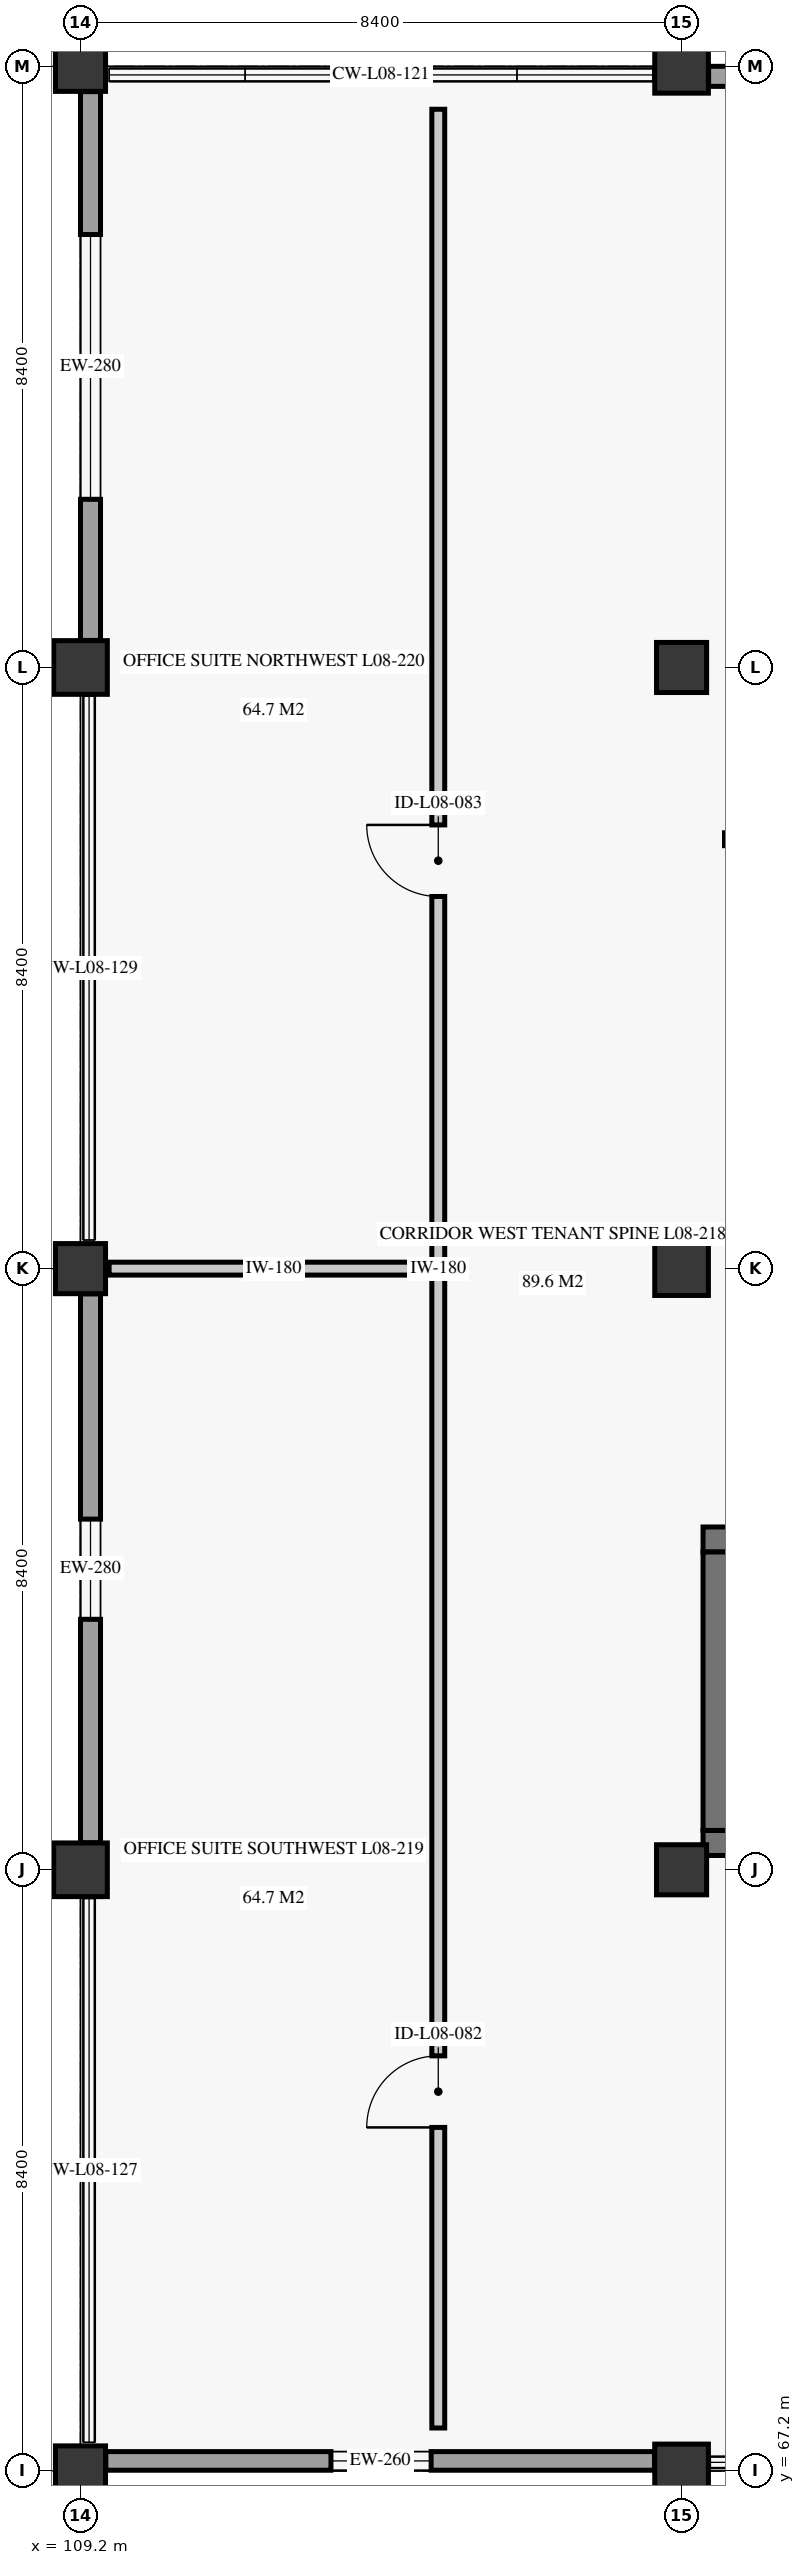
"""IFC4 building model, lengths in metres.
Left out: names, types, materials, properties, quantities, classifications, styles, units other than length and angle.
Written with IfcOpenShell. Run it as: python <this file> out.ifc"""

import sys

from ifc_helpers import new_model, si_unit, direction, frame, frame_2d, origin, origin_2d, place, context, subcontext, project, spatial, rectangle, extrude, element, fill, save


model = new_model("IFC4")
c1 = context("Model", 3, precision=1e-05, world=origin(), true_north=direction((0.0, 1.0)))
c2 = subcontext(c1, "Body", "Model", "MODEL_VIEW")
j1 = project(units=[si_unit("LENGTHUNIT", "METRE"), si_unit("PLANEANGLEUNIT", "RADIAN")], contexts=[c1])
p1 = place(None, origin())
s1 = spatial("IfcSite", under=j1, at=p1, CompositionType="ELEMENT")
p2 = place(p1, origin())
s2 = spatial("IfcBuilding", under=s1, at=p2, CompositionType="ELEMENT")
p3 = place(p2, frame((0.0, 0.0, 34.7)))
s3 = spatial("IfcBuildingStorey", under=s2, at=p3, CompositionType="ELEMENT", Elevation=34.7)
p4 = place(p3, frame((109.2, 67.2, 0.0), z_axis=(0.0, 0.0, 1.0), x_axis=(1.0, 0.0, 0.0)))
e1 = element("IfcColumn", 1, at=p4, inside=s3, PredefinedType="COLUMN", context=c2, shape_type="SweptSolid", body=[
    extrude(rectangle(XDim=0.7, YDim=0.7, at=origin_2d()), origin(), (0.0, 0.0, 1.0), 3.72),
])
p5 = place(p3, frame((109.2, 75.6, 0.0), z_axis=(0.0, 0.0, 1.0), x_axis=(1.0, 0.0, 0.0)))
e2 = element("IfcColumn", 2, at=p5, inside=s3, PredefinedType="COLUMN", context=c2, shape_type="SweptSolid", body=[
    extrude(rectangle(XDim=0.75, YDim=0.75, at=origin_2d()), origin(), (0.0, 0.0, 1.0), 3.72),
])
p6 = place(p3, frame((109.2, 84.0, 0.0), z_axis=(0.0, 0.0, 1.0), x_axis=(1.0, 0.0, 0.0)))
e3 = element("IfcColumn", 3, at=p6, inside=s3, PredefinedType="COLUMN", context=c2, shape_type="SweptSolid", body=[
    extrude(rectangle(XDim=0.7, YDim=0.7, at=origin_2d()), origin(), (0.0, 0.0, 1.0), 3.72),
])
p7 = place(p3, frame((109.2, 92.4, 0.0), z_axis=(0.0, 0.0, 1.0), x_axis=(1.0, 0.0, 0.0)))
e4 = element("IfcColumn", 4, at=p7, inside=s3, PredefinedType="COLUMN", context=c2, shape_type="SweptSolid", body=[
    extrude(rectangle(XDim=0.75, YDim=0.75, at=origin_2d()), origin(), (0.0, 0.0, 1.0), 3.72),
])
p8 = place(p3, frame((109.2, 100.8, 0.0), z_axis=(0.0, 0.0, 1.0), x_axis=(1.0, 0.0, 0.0)))
e5 = element("IfcColumn", 5, at=p8, inside=s3, PredefinedType="COLUMN", context=c2, shape_type="SweptSolid", body=[
    extrude(rectangle(XDim=0.7, YDim=0.7, at=origin_2d()), origin(), (0.0, 0.0, 1.0), 3.72),
])
p9 = place(p3, frame((117.6, 67.2, 0.0), z_axis=(0.0, 0.0, 1.0), x_axis=(1.0, 0.0, 0.0)))
e6 = element("IfcColumn", 6, at=p9, inside=s3, PredefinedType="COLUMN", context=c2, shape_type="SweptSolid", body=[
    extrude(rectangle(XDim=0.75, YDim=0.75, at=origin_2d()), origin(), (0.0, 0.0, 1.0), 3.72),
])
p10 = place(p3, frame((117.6, 75.6, 0.0), z_axis=(0.0, 0.0, 1.0), x_axis=(1.0, 0.0, 0.0)))
e7 = element("IfcColumn", 7, at=p10, inside=s3, PredefinedType="COLUMN", context=c2, shape_type="SweptSolid", body=[
    extrude(rectangle(XDim=0.7, YDim=0.7, at=origin_2d()), origin(), (0.0, 0.0, 1.0), 3.72),
])
p11 = place(p3, frame((117.6, 84.0, 0.0), z_axis=(0.0, 0.0, 1.0), x_axis=(1.0, 0.0, 0.0)))
e8 = element("IfcColumn", 8, at=p11, inside=s3, PredefinedType="COLUMN", context=c2, shape_type="SweptSolid", body=[
    extrude(rectangle(XDim=0.75, YDim=0.75, at=origin_2d()), origin(), (0.0, 0.0, 1.0), 3.72),
])
p12 = place(p3, frame((117.6, 92.4, 0.0), z_axis=(0.0, 0.0, 1.0), x_axis=(1.0, 0.0, 0.0)))
e9 = element("IfcColumn", 9, at=p12, inside=s3, PredefinedType="COLUMN", context=c2, shape_type="SweptSolid", body=[
    extrude(rectangle(XDim=0.7, YDim=0.7, at=origin_2d()), origin(), (0.0, 0.0, 1.0), 3.72),
])
p13 = place(p3, frame((117.6, 100.8, 0.0), z_axis=(0.0, 0.0, 1.0), x_axis=(1.0, 0.0, 0.0)))
e10 = element("IfcColumn", 10, at=p13, inside=s3, PredefinedType="COLUMN", context=c2, shape_type="SweptSolid", body=[
    extrude(rectangle(XDim=0.75, YDim=0.75, at=origin_2d()), origin(), (0.0, 0.0, 1.0), 3.72),
])
p14 = place(p3, frame((109.554, 67.34, 0.0), z_axis=(0.0, 0.0, 1.0), x_axis=(1.0, 0.0, 0.0)))
e11 = element("IfcWall", 11, at=p14, inside=s3, PredefinedType="SOLIDWALL", context=c2, shape_type="SweptSolid", body=[
    extrude(rectangle(XDim=7.668, YDim=0.26, at=frame_2d((3.834, 0.0))), origin(), (0.0, 0.0, 1.0), 3.04),
])
p15 = place(p14, frame((3.146, 0.0, 0.85)))
e12 = element("IfcOpeningElement", 12, at=p15, cuts=e11, PredefinedType="OPENING", context=c2, shape_type="SweptSolid", body=[
    extrude(rectangle(XDim=1.4, YDim=1.7, at=frame_2d((0.7, 0.85))), frame((0.0, 0.14, 0.0), z_axis=(0.0, -1.0, 0.0), x_axis=(1.0, 0.0, 0.0)), (0.0, 0.0, 1.0), 0.28),
])
p16 = place(p3, frame((117.978, 100.66, 0.0), z_axis=(0.0, 0.0, 1.0), x_axis=(1.0, 0.0, 0.0)))
e13 = element("IfcWall", 13, at=p16, inside=s3, PredefinedType="SOLIDWALL", context=c2, shape_type="SweptSolid", body=[
    extrude(rectangle(XDim=7.67, YDim=0.28, at=frame_2d((3.835, 0.0))), origin(), (0.0, 0.0, 1.0), 3.04),
])
p17 = place(p16, frame((2.422, 0.0, 0.85)))
e14 = element("IfcOpeningElement", 14, at=p17, cuts=e13, PredefinedType="OPENING", context=c2, shape_type="SweptSolid", body=[
    extrude(rectangle(XDim=2.8, YDim=1.85, at=frame_2d((1.4, 0.925))), frame((0.0, 0.15, 0.0), z_axis=(0.0, -1.0, 0.0), x_axis=(1.0, 0.0, 0.0)), (0.0, 0.0, 1.0), 0.3),
])
p18 = place(p3, frame((109.34, 75.978, 0.0), z_axis=(0.0, 0.0, 1.0), x_axis=(0.0, 1.0, 0.0)))
e15 = element("IfcWall", 15, at=p18, inside=s3, PredefinedType="SOLIDWALL", context=c2, shape_type="SweptSolid", body=[
    extrude(rectangle(XDim=7.67, YDim=0.28, at=frame_2d((3.835, 0.0))), origin(), (0.0, 0.0, 1.0), 3.04),
])
p19 = place(p18, frame((3.122, 0.0, 0.85)))
e16 = element("IfcOpeningElement", 16, at=p19, cuts=e15, PredefinedType="OPENING", context=c2, shape_type="SweptSolid", body=[
    extrude(rectangle(XDim=1.4, YDim=1.7, at=frame_2d((0.7, 0.85))), frame((0.0, 0.15, 0.0), z_axis=(0.0, -1.0, 0.0), x_axis=(1.0, 0.0, 0.0)), (0.0, 0.0, 1.0), 0.3),
])
p20 = place(p3, frame((109.34, 92.778, 0.0), z_axis=(0.0, 0.0, 1.0), x_axis=(0.0, 1.0, 0.0)))
e17 = element("IfcWall", 17, at=p20, inside=s3, PredefinedType="SOLIDWALL", context=c2, shape_type="SweptSolid", body=[
    extrude(rectangle(XDim=7.668, YDim=0.28, at=frame_2d((3.834, 0.0))), origin(), (0.0, 0.0, 1.0), 3.04),
])
p21 = place(p20, frame((1.972, 0.0, 0.85)))
e18 = element("IfcOpeningElement", 18, at=p21, cuts=e17, PredefinedType="OPENING", context=c2, shape_type="SweptSolid", body=[
    extrude(rectangle(XDim=3.7, YDim=1.9, at=frame_2d((1.85, 0.95))), frame((0.0, 0.15, 0.0), z_axis=(0.0, -1.0, 0.0), x_axis=(1.0, 0.0, 0.0)), (0.0, 0.0, 1.0), 0.3),
])
p22 = place(p3, frame((117.9, 75.975, 0.0), z_axis=(0.0, 0.0, 1.0), x_axis=(1.0, 0.0, 0.0)))
e19 = element("IfcWall", 19, at=p22, inside=s3, PredefinedType="SHEAR", context=c2, shape_type="SweptSolid", body=[
    extrude(rectangle(XDim=9.75, YDim=0.35, at=frame_2d((4.875, 0.0))), origin(), (0.0, 0.0, 1.0), 3.72),
])
p23 = place(p3, frame((117.9, 80.215, 0.0), z_axis=(0.0, 0.0, 1.0), x_axis=(1.0, 0.0, 0.0)))
e20 = element("IfcWall", 20, at=p23, inside=s3, PredefinedType="SHEAR", context=c2, shape_type="SweptSolid", body=[
    extrude(rectangle(XDim=9.75, YDim=0.35, at=frame_2d((4.875, 0.0))), origin(), (0.0, 0.0, 1.0), 3.72),
])
p24 = place(p23, frame((0.72, 0.0, 0.0)))
e21 = element("IfcOpeningElement", 21, at=p24, cuts=e20, PredefinedType="OPENING", context=c2, shape_type="SweptSolid", body=[
    extrude(rectangle(XDim=1.25, YDim=2.2, at=frame_2d((0.625, 1.1))), frame((0.0, 0.185, 0.0), z_axis=(0.0, -1.0, 0.0), x_axis=(1.0, 0.0, 0.0)), (0.0, 0.0, 1.0), 0.37),
])
p25 = place(p3, frame((118.075, 76.15, 0.0), z_axis=(0.0, 0.0, 1.0), x_axis=(0.0, 1.0, 0.0)))
e22 = element("IfcWall", 22, at=p25, inside=s3, PredefinedType="SHEAR", context=c2, shape_type="SweptSolid", body=[
    extrude(rectangle(XDim=3.89, YDim=0.35, at=frame_2d((1.945, 0.0))), origin(), (0.0, 0.0, 1.0), 3.72),
])
p26 = place(p3, frame((114.2, 67.8, 0.0), z_axis=(0.0, 0.0, 1.0), x_axis=(0.0, 1.0, 0.0)))
e23 = element("IfcWall", 23, at=p26, inside=s3, PredefinedType="PARTITIONING", context=c2, shape_type="SweptSolid", body=[
    extrude(rectangle(XDim=32.4, YDim=0.18, at=frame_2d((16.2, 0.0))), origin(), (0.0, 0.0, 1.0), 3.34),
])
p27 = place(p26, frame((4.2, 0.0, 0.0)))
e24 = element("IfcOpeningElement", 24, at=p27, cuts=e23, PredefinedType="OPENING", context=c2, shape_type="SweptSolid", body=[
    extrude(rectangle(XDim=1.0, YDim=2.15, at=frame_2d((0.5, 1.075))), frame((0.0, 0.1, 0.0), z_axis=(0.0, -1.0, 0.0), x_axis=(1.0, 0.0, 0.0)), (0.0, 0.0, 1.0), 0.2),
])
p28 = place(p26, frame((21.4, 0.0, 0.0)))
e25 = element("IfcOpeningElement", 25, at=p28, cuts=e23, PredefinedType="OPENING", context=c2, shape_type="SweptSolid", body=[
    extrude(rectangle(XDim=1.0, YDim=2.15, at=frame_2d((0.5, 1.075))), frame((0.0, 0.1, 0.0), z_axis=(0.0, -1.0, 0.0), x_axis=(1.0, 0.0, 0.0)), (0.0, 0.0, 1.0), 0.2),
])
p29 = place(p3, frame((109.6, 84.0, 0.0), z_axis=(0.0, 0.0, 1.0), x_axis=(1.0, 0.0, 0.0)))
e26 = element("IfcWall", 26, at=p29, inside=s3, PredefinedType="PARTITIONING", context=c2, shape_type="SweptSolid", body=[
    extrude(rectangle(XDim=4.6, YDim=0.18, at=frame_2d((2.3, 0.0))), origin(), (0.0, 0.0, 1.0), 3.34),
])
p30 = place(p15, origin())
e27 = element("IfcWindow", 27, at=p30, inside=s3, PartitioningType="SINGLE_PANEL", PredefinedType="WINDOW", context=c2, shape_type="SweptSolid", body=[
    extrude(rectangle(XDim=1.4, YDim=1.7, at=frame_2d((0.7, 0.85))), frame((0.0, 0.03, 0.0), z_axis=(0.0, -1.0, 0.0), x_axis=(1.0, 0.0, 0.0)), (0.0, 0.0, 1.0), 0.06),
])
fill(e12, e27)
p31 = place(p19, origin())
e28 = element("IfcWindow", 28, at=p31, inside=s3, PartitioningType="SINGLE_PANEL", PredefinedType="WINDOW", context=c2, shape_type="SweptSolid", body=[
    extrude(rectangle(XDim=1.4, YDim=1.7, at=frame_2d((0.7, 0.85))), frame((0.0, 0.03, 0.0), z_axis=(0.0, -1.0, 0.0), x_axis=(1.0, 0.0, 0.0)), (0.0, 0.0, 1.0), 0.06),
])
fill(e16, e28)
p32 = place(p21, origin())
e29 = element("IfcWindow", 29, at=p32, inside=s3, PartitioningType="SINGLE_PANEL", PredefinedType="WINDOW", context=c2, shape_type="SweptSolid", body=[
    extrude(rectangle(XDim=3.7, YDim=1.9, at=frame_2d((1.85, 0.95))), frame((0.0, 0.03, 0.0), z_axis=(0.0, -1.0, 0.0), x_axis=(1.0, 0.0, 0.0)), (0.0, 0.0, 1.0), 0.06),
])
fill(e18, e29)
p33 = place(p27, origin())
e30 = element("IfcDoor", 30, at=p33, inside=s3, OperationType="SINGLE_SWING_LEFT", PredefinedType="DOOR", context=c2, shape_type="SweptSolid", body=[
    extrude(rectangle(XDim=1.0, YDim=2.15, at=frame_2d((0.5, 1.075))), frame((0.0, 0.025, 0.0), z_axis=(0.0, -1.0, 0.0), x_axis=(1.0, 0.0, 0.0)), (0.0, 0.0, 1.0), 0.05),
])
fill(e24, e30)
p34 = place(p28, origin())
e31 = element("IfcDoor", 31, at=p34, inside=s3, OperationType="SINGLE_SWING_RIGHT", PredefinedType="DOOR", context=c2, shape_type="SweptSolid", body=[
    extrude(rectangle(XDim=1.0, YDim=2.15, at=frame_2d((0.5, 1.075))), frame((0.0, 0.025, 0.0), z_axis=(0.0, -1.0, 0.0), x_axis=(1.0, 0.0, 0.0)), (0.0, 0.0, 1.0), 0.05),
])
fill(e25, e31)
save(model, sys.argv[1])
